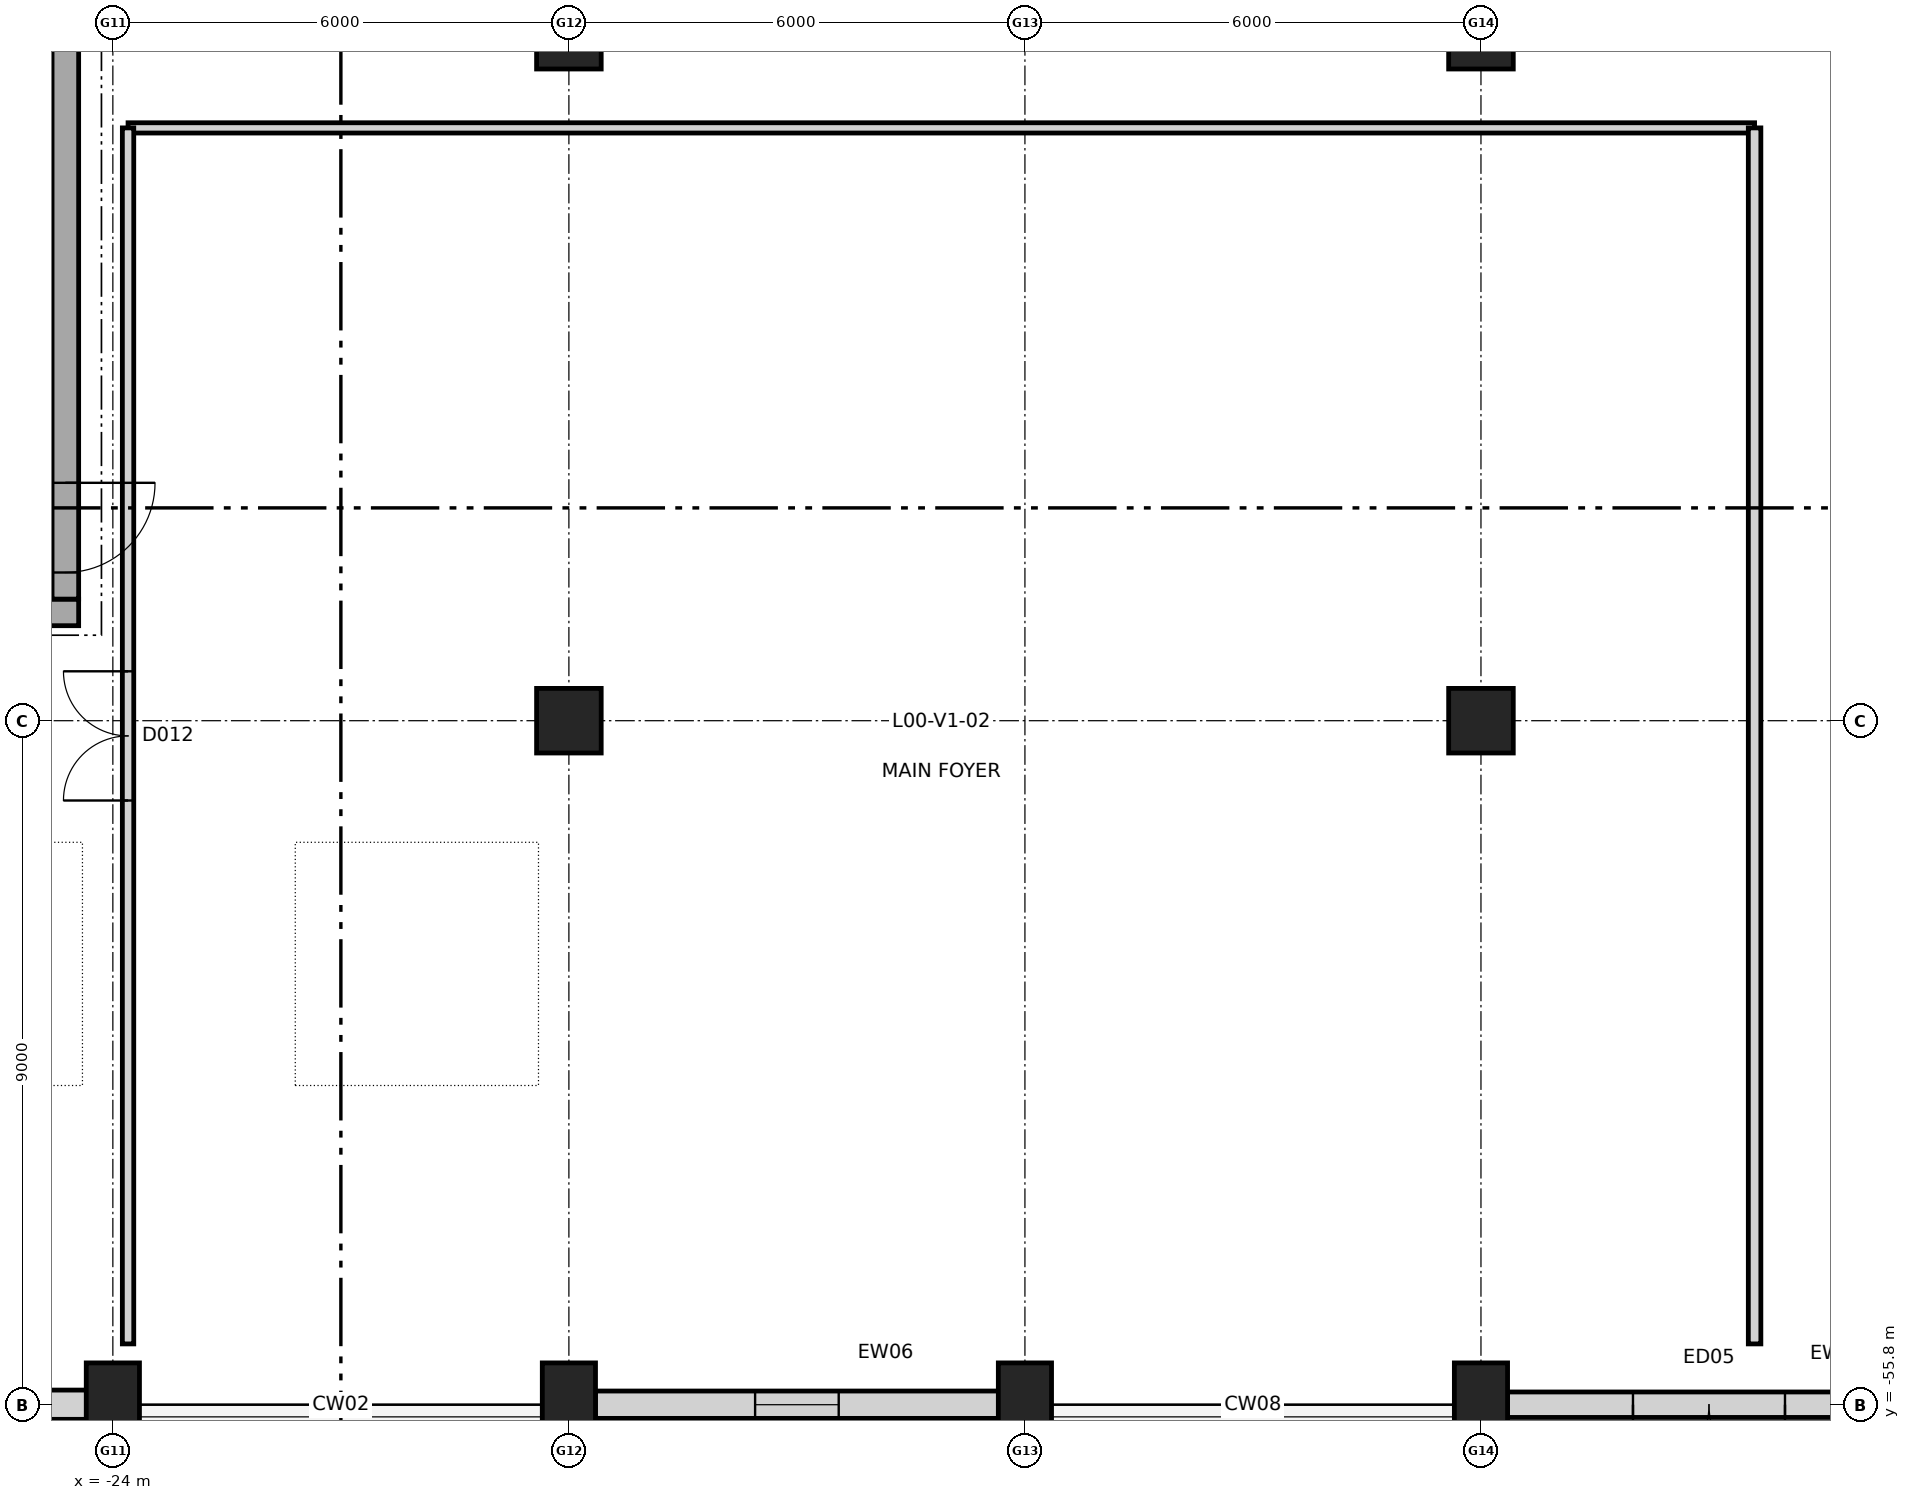
"""IFC4 building model, lengths in metres.
Left out: names, types, materials, properties, quantities, classifications, styles, units other than length and angle.
Written with IfcOpenShell. Run it as: python <this file> out.ifc"""

import sys

from ifc_helpers import new_model, si_unit, direction, frame, frame_2d, origin, origin_2d, place, context, subcontext, project, spatial, rectangle, circle, extrude, element, fill, save


model = new_model("IFC4")
c1 = context("Model", 3, precision=1e-05, world=origin(), true_north=direction((0.0, 1.0)))
c2 = subcontext(c1, "Body", "Model", "MODEL_VIEW")
j1 = project(units=[si_unit("LENGTHUNIT", "METRE"), si_unit("PLANEANGLEUNIT", "RADIAN")], contexts=[c1])
p1 = place(None, origin())
s1 = spatial("IfcSite", under=j1, at=p1, CompositionType="ELEMENT")
p2 = place(p1, origin())
s2 = spatial("IfcBuilding", under=s1, at=p2, CompositionType="ELEMENT")
p3 = place(p2, origin())
s3 = spatial("IfcBuildingStorey", under=s2, at=p3, CompositionType="ELEMENT", Elevation=0.0)
for number, where, z_axis, x_axis in (
    (1, (-24.0, -55.8, 0.0), (0.0, 0.0, 1.0), (1.0, 0.0, 0.0)),
    (2, (-18.0, -55.8, 0.0), (0.0, 0.0, 1.0), (1.0, 0.0, 0.0)),
):
    element("IfcColumn", number, at=place(p3, frame(where, z_axis=z_axis, x_axis=x_axis)), inside=s3, PredefinedType="COLUMN", context=c2, shape_type="SweptSolid", body=[
        extrude(rectangle(XDim=0.7, YDim=1.1, at=origin_2d()), origin(), (0.0, 0.0, 1.0), 5.4),
    ])
for number, where, z_axis, x_axis in (
    (3, (-18.0, -46.8, 0.0), (0.0, 0.0, 1.0), (1.0, 0.0, 0.0)),
    (4, (-18.0, -37.8, 0.0), (0.0, 0.0, 1.0), (1.0, 0.0, 0.0)),
):
    element("IfcColumn", number, at=place(p3, frame(where, z_axis=z_axis, x_axis=x_axis)), inside=s3, PredefinedType="COLUMN", context=c2, shape_type="SweptSolid", body=[
        extrude(circle(Radius=0.425, at=origin_2d()), origin(), (0.0, 0.0, 1.0), 5.4),
    ])
for number, where, z_axis, x_axis in (
    (5, (-12.0, -55.8, 0.0), (0.0, 0.0, 1.0), (1.0, 0.0, 0.0)),
    (6, (-6.0, -55.8, 0.0), (0.0, 0.0, 1.0), (1.0, 0.0, 0.0)),
):
    element("IfcColumn", number, at=place(p3, frame(where, z_axis=z_axis, x_axis=x_axis)), inside=s3, PredefinedType="COLUMN", context=c2, shape_type="SweptSolid", body=[
        extrude(rectangle(XDim=0.7, YDim=1.1, at=origin_2d()), origin(), (0.0, 0.0, 1.0), 5.4),
    ])
for number, where, z_axis, x_axis in (
    (7, (-6.0, -46.8, 0.0), (0.0, 0.0, 1.0), (1.0, 0.0, 0.0)),
    (8, (-6.0, -37.8, 0.0), (0.0, 0.0, 1.0), (1.0, 0.0, 0.0)),
):
    element("IfcColumn", number, at=place(p3, frame(where, z_axis=z_axis, x_axis=x_axis)), inside=s3, PredefinedType="COLUMN", context=c2, shape_type="SweptSolid", body=[
        extrude(circle(Radius=0.425, at=origin_2d()), origin(), (0.0, 0.0, 1.0), 5.4),
    ])
p4 = place(p3, frame((-0.348, -55.8, 0.0), z_axis=(0.0, 0.0, 1.0), x_axis=(-1.0, 0.0, 0.0)))
e9 = element("IfcWall", 9, at=p4, inside=s3, PredefinedType="STANDARD", context=c2, shape_type="SweptSolid", body=[
    extrude(rectangle(XDim=5.304, YDim=0.335, at=frame_2d((2.652, 0.0))), origin(), (0.0, 0.0, 1.0), 4.32),
])
p5 = place(p4, frame((1.652, 0.0, 0.0)))
e10 = element("IfcOpeningElement", 10, at=p5, cuts=e9, PredefinedType="OPENING", context=c2, shape_type="SweptSolid", body=[
    extrude(rectangle(XDim=2.0, YDim=2.4, at=frame_2d((1.0, 1.2))), frame((0.0, 0.177, 0.0), z_axis=(0.0, -1.0, 0.0), x_axis=(1.0, 0.0, 0.0)), (0.0, 0.0, 1.0), 0.355),
])
p6 = place(p3, frame((-12.348, -55.8, 0.0), z_axis=(0.0, 0.0, 1.0), x_axis=(-1.0, 0.0, 0.0)))
e11 = element("IfcWall", 11, at=p6, inside=s3, PredefinedType="STANDARD", context=c2, shape_type="SweptSolid", body=[
    extrude(rectangle(XDim=5.304, YDim=0.36, at=frame_2d((2.652, 0.0))), origin(), (0.0, 0.0, 1.0), 4.32),
])
p7 = place(p6, frame((2.102, 0.0, 0.85)))
e12 = element("IfcOpeningElement", 12, at=p7, cuts=e11, PredefinedType="OPENING", context=c2, shape_type="SweptSolid", body=[
    extrude(rectangle(XDim=1.1, YDim=1.6, at=frame_2d((0.55, 0.8))), frame((0.0, 0.19, 0.0), z_axis=(0.0, -1.0, 0.0), x_axis=(1.0, 0.0, 0.0)), (0.0, 0.0, 1.0), 0.38),
])
p8 = place(p3, frame((-24.348, -55.8, 0.0), z_axis=(0.0, 0.0, 1.0), x_axis=(-1.0, 0.0, 0.0)))
e13 = element("IfcWall", 13, at=p8, inside=s3, PredefinedType="STANDARD", context=c2, shape_type="SweptSolid", body=[
    extrude(rectangle(XDim=5.304, YDim=0.385, at=frame_2d((2.652, 0.0))), origin(), (0.0, 0.0, 1.0), 4.32),
])
p9 = place(p8, frame((2.027, 0.0, 0.85)))
e14 = element("IfcOpeningElement", 14, at=p9, cuts=e13, PredefinedType="OPENING", context=c2, shape_type="SweptSolid", body=[
    extrude(rectangle(XDim=1.25, YDim=1.6, at=frame_2d((0.625, 0.8))), frame((0.0, 0.202, 0.0), z_axis=(0.0, -1.0, 0.0), x_axis=(1.0, 0.0, 0.0)), (0.0, 0.0, 1.0), 0.405),
])
p10 = place(p3, frame((-24.45, -45.375, 0.0), z_axis=(0.0, 0.0, 1.0), x_axis=(-1.0, 0.0, 0.0)))
e15 = element("IfcWall", 15, at=p10, inside=s3, PredefinedType="SHEAR", context=c2, shape_type="SweptSolid", body=[
    extrude(rectangle(XDim=4.6, YDim=0.35, at=frame_2d((2.3, 0.0))), origin(), (0.0, 0.0, 1.0), 5.4),
])
p11 = place(p3, frame((-24.625, -36.9, 0.0), z_axis=(0.0, 0.0, 1.0), x_axis=(0.0, -1.0, 0.0)))
e16 = element("IfcWall", 16, at=p11, inside=s3, PredefinedType="SHEAR", context=c2, shape_type="SweptSolid", body=[
    extrude(rectangle(XDim=8.3, YDim=0.35, at=frame_2d((4.15, 0.0))), origin(), (0.0, 0.0, 1.0), 5.4),
])
p12 = place(p11, frame((6.77, 0.0, 0.0)))
e17 = element("IfcOpeningElement", 17, at=p12, cuts=e16, PredefinedType="OPENING", context=c2, shape_type="SweptSolid", body=[
    extrude(rectangle(XDim=1.18, YDim=2.15, at=frame_2d((0.59, 1.075))), frame((0.0, 0.185, 0.0), z_axis=(0.0, -1.0, 0.0), x_axis=(1.0, 0.0, 0.0)), (0.0, 0.0, 1.0), 0.37),
])
p13 = place(p3, frame((-23.8, -39.0, 0.0), z_axis=(0.0, 0.0, 1.0), x_axis=(1.0, 0.0, 0.0)))
e18 = element("IfcWall", 18, at=p13, inside=s3, PredefinedType="PARTITIONING", context=c2, shape_type="SweptSolid", body=[
    extrude(rectangle(XDim=21.4, YDim=0.135, at=frame_2d((10.7, 0.0))), origin(), (0.0, 0.0, 1.0), 5.02),
])
p14 = place(p3, frame((-23.8, -55.0, 0.0), z_axis=(0.0, 0.0, 1.0), x_axis=(0.0, 1.0, 0.0)))
e19 = element("IfcWall", 19, at=p14, inside=s3, PredefinedType="PARTITIONING", context=c2, shape_type="SweptSolid", body=[
    extrude(rectangle(XDim=16.0, YDim=0.15, at=frame_2d((8.0, 0.0))), origin(), (0.0, 0.0, 1.0), 5.02),
])
p15 = place(p14, frame((7.15, 0.0, 0.0)))
e20 = element("IfcOpeningElement", 20, at=p15, cuts=e19, PredefinedType="OPENING", context=c2, shape_type="SweptSolid", body=[
    extrude(rectangle(XDim=1.7, YDim=2.25, at=frame_2d((0.85, 1.125))), frame((0.0, 0.085, 0.0), z_axis=(0.0, -1.0, 0.0), x_axis=(1.0, 0.0, 0.0)), (0.0, 0.0, 1.0), 0.17),
])
p16 = place(p3, frame((-2.4, -55.0, 0.0), z_axis=(0.0, 0.0, 1.0), x_axis=(0.0, 1.0, 0.0)))
e21 = element("IfcWall", 21, at=p16, inside=s3, PredefinedType="PARTITIONING", context=c2, shape_type="SweptSolid", body=[
    extrude(rectangle(XDim=16.0, YDim=0.165, at=frame_2d((8.0, 0.0))), origin(), (0.0, 0.0, 1.0), 5.02),
])
p17 = place(p5, origin())
e22 = element("IfcDoor", 22, at=p17, inside=s3, OperationType="DOUBLE_DOOR_SINGLE_SWING", PredefinedType="DOOR", context=c2, shape_type="SweptSolid", body=[
    extrude(rectangle(XDim=2.0, YDim=2.4, at=frame_2d((1.0, 1.2))), frame((0.0, 0.025, 0.0), z_axis=(0.0, -1.0, 0.0), x_axis=(1.0, 0.0, 0.0)), (0.0, 0.0, 1.0), 0.05),
])
fill(e10, e22)
p18 = place(p7, origin())
e23 = element("IfcWindow", 23, at=p18, inside=s3, PartitioningType="SINGLE_PANEL", PredefinedType="WINDOW", context=c2, shape_type="SweptSolid", body=[
    extrude(rectangle(XDim=1.1, YDim=1.6, at=frame_2d((0.55, 0.8))), frame((0.0, 0.03, 0.0), z_axis=(0.0, -1.0, 0.0), x_axis=(1.0, 0.0, 0.0)), (0.0, 0.0, 1.0), 0.06),
])
fill(e12, e23)
p19 = place(p12, origin())
e24 = element("IfcDoor", 24, at=p19, inside=s3, OperationType="SINGLE_SWING_LEFT", PredefinedType="DOOR", context=c2, shape_type="SweptSolid", body=[
    extrude(rectangle(XDim=1.18, YDim=2.15, at=frame_2d((0.59, 1.075))), frame((0.0, 0.025, 0.0), z_axis=(0.0, -1.0, 0.0), x_axis=(1.0, 0.0, 0.0)), (0.0, 0.0, 1.0), 0.05),
])
fill(e17, e24)
p20 = place(p15, origin())
e25 = element("IfcDoor", 25, at=p20, inside=s3, OperationType="DOUBLE_DOOR_SINGLE_SWING", PredefinedType="DOOR", context=c2, shape_type="SweptSolid", body=[
    extrude(rectangle(XDim=1.7, YDim=2.25, at=frame_2d((0.85, 1.125))), frame((0.0, 0.025, 0.0), z_axis=(0.0, -1.0, 0.0), x_axis=(1.0, 0.0, 0.0)), (0.0, 0.0, 1.0), 0.05),
])
fill(e20, e25)
save(model, sys.argv[1])
